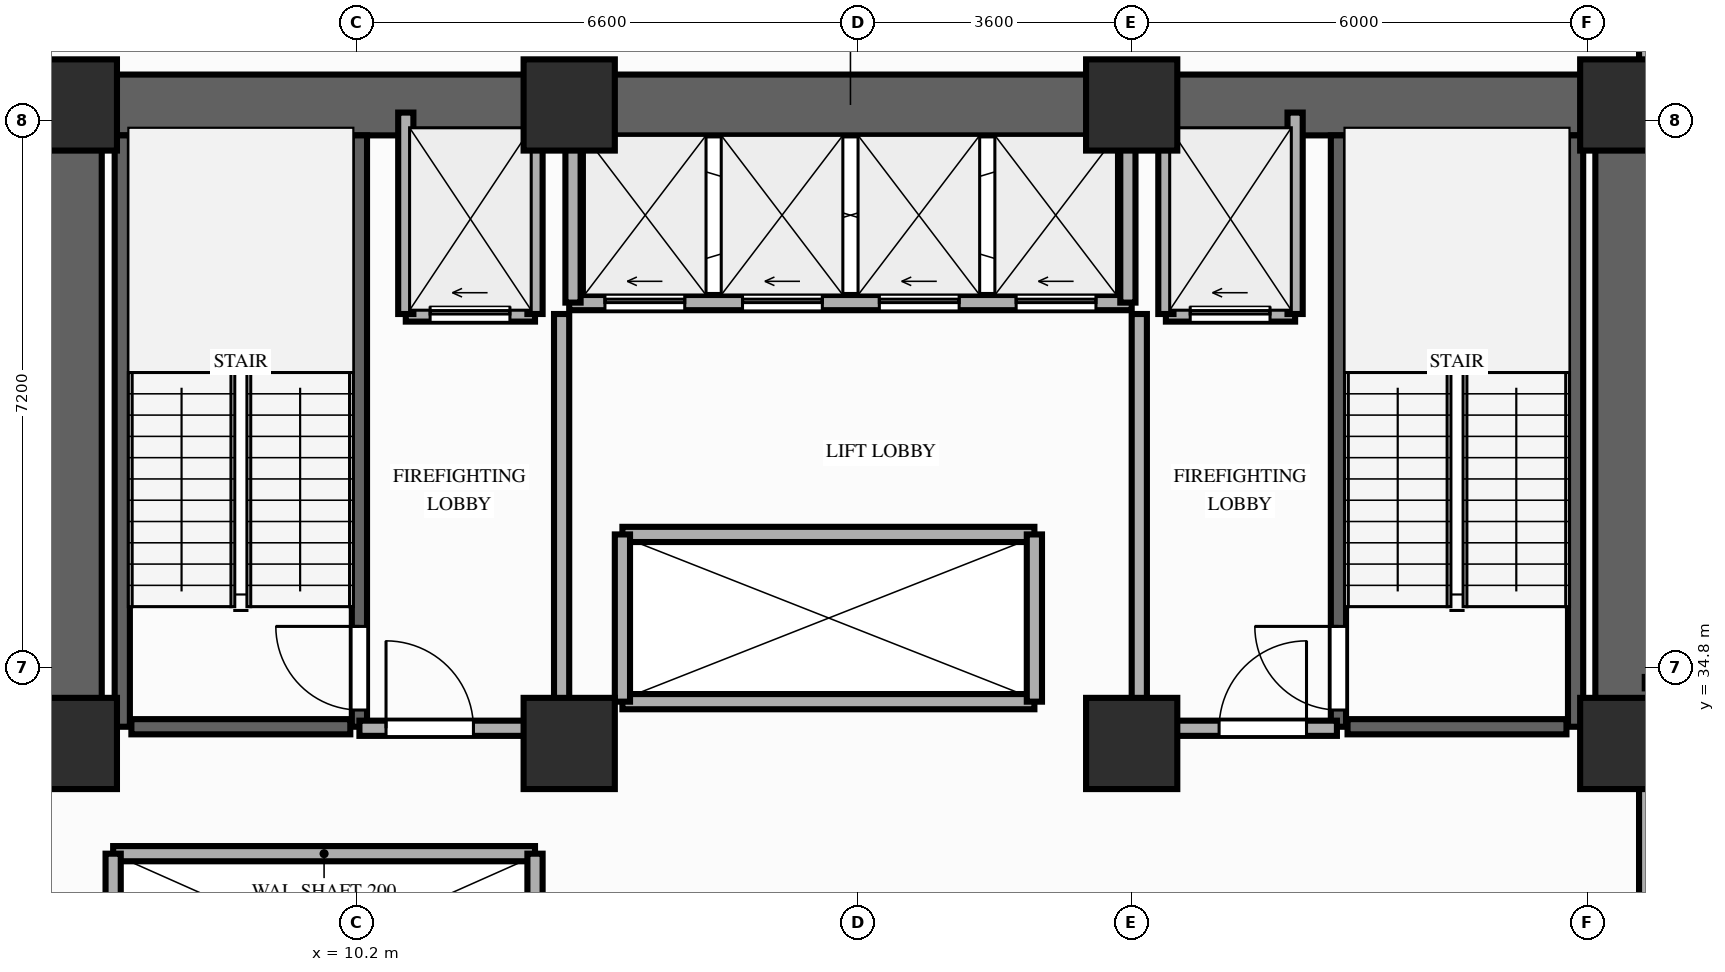
"""IFC4 building model, lengths in metres.
Left out: names, types, materials, properties, quantities, classifications, styles, units other than length and angle.
Written with IfcOpenShell. Run it as: python <this file> out.ifc"""

import sys

from ifc_helpers import new_model, si_unit, direction, frame, frame_2d, origin, origin_2d, place, context, subcontext, project, spatial, rectangle, extrude, element, fill, save


model = new_model("IFC4")
c1 = context("Model", 3, precision=1e-05, world=origin(), true_north=direction((0.0, 1.0)))
c2 = subcontext(c1, "Body", "Model", "MODEL_VIEW")
j1 = project(units=[si_unit("LENGTHUNIT", "METRE"), si_unit("PLANEANGLEUNIT", "RADIAN")], contexts=[c1])
p1 = place(None, origin())
s1 = spatial("IfcSite", under=j1, at=p1, CompositionType="ELEMENT")
p2 = place(p1, origin())
s2 = spatial("IfcBuilding", under=s1, at=p2, CompositionType="ELEMENT")
p3 = place(p2, frame((0.0, 0.0, 8.8)))
s3 = spatial("IfcBuildingStorey", under=s2, at=p3, CompositionType="ELEMENT", Elevation=8.8)
for number, where, z_axis, x_axis in (
    (1, (6.45, 33.8, 0.0), (0.0, 0.0, 1.0), (1.0, 0.0, 0.0)),
    (2, (13.0, 33.8, 0.0), (0.0, 0.0, 1.0), (1.0, 0.0, 0.0)),
    (3, (20.4, 33.8, 0.0), (0.0, 0.0, 1.0), (1.0, 0.0, 0.0)),
    (4, (26.9, 33.8, 0.0), (0.0, 0.0, 1.0), (1.0, 0.0, 0.0)),
    (5, (6.45, 42.2, 0.0), (0.0, 0.0, 1.0), (1.0, 0.0, 0.0)),
    (6, (13.0, 42.2, 0.0), (0.0, 0.0, 1.0), (1.0, 0.0, 0.0)),
    (7, (20.4, 42.2, 0.0), (0.0, 0.0, 1.0), (1.0, 0.0, 0.0)),
    (8, (26.9, 42.2, 0.0), (0.0, 0.0, 1.0), (1.0, 0.0, 0.0)),
):
    element("IfcColumn", number, at=place(p3, frame(where, z_axis=z_axis, x_axis=x_axis)), inside=s3, PredefinedType="COLUMN", context=c2, shape_type="SweptSolid", body=[
        extrude(rectangle(XDim=1.2, YDim=1.2, at=origin_2d()), origin(), (0.0, 0.0, 1.0), 4.2),
    ])
p4 = place(p3, frame((6.45, 42.2, 0.0), z_axis=(0.0, 0.0, 1.0), x_axis=(1.0, 0.0, 0.0)))
e9 = element("IfcWall", 9, at=p4, inside=s3, PredefinedType="SHEAR", context=c2, shape_type="SweptSolid", body=[
    extrude(rectangle(XDim=20.45, YDim=0.8, at=frame_2d((10.225, 0.0))), origin(), (0.0, 0.0, 1.0), 3.95),
])
for number, where, z_axis, x_axis in (
    (10, (6.45, 33.8, 0.0), (0.0, 0.0, 1.0), (0.0, 1.0, 0.0)),
    (11, (26.9, 33.8, 0.0), (0.0, 0.0, 1.0), (0.0, 1.0, 0.0)),
):
    element("IfcWall", number, at=place(p3, frame(where, z_axis=z_axis, x_axis=x_axis)), inside=s3, PredefinedType="SHEAR", context=c2, shape_type="SweptSolid", body=[
        extrude(rectangle(XDim=7.95, YDim=0.8, at=frame_2d((3.975, 0.0))), origin(), (0.0, 0.0, 1.0), 3.95),
    ])
p5 = place(p3, frame((7.12, 34.02, 0.0), z_axis=(0.0, 0.0, 1.0), x_axis=(0.0, 1.0, 0.0)))
e12 = element("IfcWall", 12, at=p5, inside=s3, PredefinedType="SHEAR", context=c2, shape_type="SweptSolid", body=[
    extrude(rectangle(XDim=7.78, YDim=0.2, at=frame_2d((3.89, 0.0))), origin(), (0.0, 0.0, 1.0), 3.95),
])
p6 = place(p3, frame((10.24, 34.02, 0.0), z_axis=(0.0, 0.0, 1.0), x_axis=(0.0, 1.0, 0.0)))
e13 = element("IfcWall", 13, at=p6, inside=s3, PredefinedType="SHEAR", context=c2, shape_type="SweptSolid", body=[
    extrude(rectangle(XDim=7.78, YDim=0.2, at=frame_2d((3.89, 0.0))), origin(), (0.0, 0.0, 1.0), 3.95),
])
p7 = place(p6, frame((0.22, 0.0, 0.0)))
e14 = element("IfcOpeningElement", 14, at=p7, cuts=e13, PredefinedType="OPENING", context=c2, shape_type="SweptSolid", body=[
    extrude(rectangle(XDim=1.1, YDim=2.15, at=frame_2d((0.55, 1.075))), frame((0.0, 0.11, 0.0), z_axis=(0.0, -1.0, 0.0), x_axis=(1.0, 0.0, 0.0)), (0.0, 0.0, 1.0), 0.22),
])
p8 = place(p3, frame((7.24, 34.02, 0.0), z_axis=(0.0, 0.0, 1.0), x_axis=(1.0, 0.0, 0.0)))
e15 = element("IfcWall", 15, at=p8, inside=s3, PredefinedType="SHEAR", context=c2, shape_type="SweptSolid", body=[
    extrude(rectangle(XDim=2.88, YDim=0.2, at=frame_2d((1.44, 0.0))), origin(), (0.0, 0.0, 1.0), 3.95),
])
p9 = place(p3, frame((23.12, 34.02, 0.0), z_axis=(0.0, 0.0, 1.0), x_axis=(0.0, 1.0, 0.0)))
e16 = element("IfcWall", 16, at=p9, inside=s3, PredefinedType="SHEAR", context=c2, shape_type="SweptSolid", body=[
    extrude(rectangle(XDim=7.78, YDim=0.2, at=frame_2d((3.89, 0.0))), origin(), (0.0, 0.0, 1.0), 3.95),
])
p10 = place(p9, frame((0.22, 0.0, 0.0)))
e17 = element("IfcOpeningElement", 17, at=p10, cuts=e16, PredefinedType="OPENING", context=c2, shape_type="SweptSolid", body=[
    extrude(rectangle(XDim=1.1, YDim=2.15, at=frame_2d((0.55, 1.075))), frame((0.0, 0.11, 0.0), z_axis=(0.0, -1.0, 0.0), x_axis=(1.0, 0.0, 0.0)), (0.0, 0.0, 1.0), 0.22),
])
p11 = place(p3, frame((26.24, 34.02, 0.0), z_axis=(0.0, 0.0, 1.0), x_axis=(0.0, 1.0, 0.0)))
e18 = element("IfcWall", 18, at=p11, inside=s3, PredefinedType="SHEAR", context=c2, shape_type="SweptSolid", body=[
    extrude(rectangle(XDim=7.78, YDim=0.2, at=frame_2d((3.89, 0.0))), origin(), (0.0, 0.0, 1.0), 3.95),
])
p12 = place(p3, frame((23.24, 34.02, 0.0), z_axis=(0.0, 0.0, 1.0), x_axis=(1.0, 0.0, 0.0)))
e19 = element("IfcWall", 19, at=p12, inside=s3, PredefinedType="SHEAR", context=c2, shape_type="SweptSolid", body=[
    extrude(rectangle(XDim=2.88, YDim=0.2, at=frame_2d((1.44, 0.0))), origin(), (0.0, 0.0, 1.0), 3.95),
])
p13 = place(p3, frame((7.0, 32.35, 0.0), z_axis=(0.0, 0.0, 1.0), x_axis=(1.0, 0.0, 0.0)))
e20 = element("IfcWall", 20, at=p13, inside=s3, PredefinedType="MOVABLE", context=c2, shape_type="SweptSolid", body=[
    extrude(rectangle(XDim=5.55, YDim=0.2, at=frame_2d((2.775, 0.0))), origin(), (0.0, 0.0, 1.0), 3.95),
])
for number, where, z_axis, x_axis in (
    (21, (7.0, 29.85, 0.0), (0.0, 0.0, 1.0), (0.0, 1.0, 0.0)),
    (22, (12.55, 29.85, 0.0), (0.0, 0.0, 1.0), (0.0, 1.0, 0.0)),
):
    element("IfcWall", number, at=place(p3, frame(where, z_axis=z_axis, x_axis=x_axis)), inside=s3, PredefinedType="MOVABLE", context=c2, shape_type="SweptSolid", body=[
        extrude(rectangle(XDim=2.5, YDim=0.2, at=frame_2d((1.25, 0.0))), origin(), (0.0, 0.0, 1.0), 3.95),
    ])
p14 = place(p3, frame((10.85, 39.45, 0.0), z_axis=(0.0, 0.0, 1.0), x_axis=(1.0, 0.0, 0.0)))
e23 = element("IfcWall", 23, at=p14, inside=s3, PredefinedType="MOVABLE", context=c2, shape_type="SweptSolid", body=[
    extrude(rectangle(XDim=1.7, YDim=0.2, at=frame_2d((0.85, 0.0))), origin(), (0.0, 0.0, 1.0), 3.95),
])
p15 = place(p14, frame((0.32, 0.0, 0.0)))
e24 = element("IfcOpeningElement", 24, at=p15, cuts=e23, PredefinedType="OPENING", context=c2, shape_type="SweptSolid", body=[
    extrude(rectangle(XDim=1.05, YDim=2.15, at=frame_2d((0.525, 1.075))), frame((0.0, 0.11, 0.0), z_axis=(0.0, -1.0, 0.0), x_axis=(1.0, 0.0, 0.0)), (0.0, 0.0, 1.0), 0.22),
])
p16 = place(p3, frame((20.85, 39.45, 0.0), z_axis=(0.0, 0.0, 1.0), x_axis=(1.0, 0.0, 0.0)))
e25 = element("IfcWall", 25, at=p16, inside=s3, PredefinedType="MOVABLE", context=c2, shape_type="SweptSolid", body=[
    extrude(rectangle(XDim=1.7, YDim=0.2, at=frame_2d((0.85, 0.0))), origin(), (0.0, 0.0, 1.0), 3.95),
])
p17 = place(p16, frame((0.32, 0.0, 0.0)))
e26 = element("IfcOpeningElement", 26, at=p17, cuts=e25, PredefinedType="OPENING", context=c2, shape_type="SweptSolid", body=[
    extrude(rectangle(XDim=1.05, YDim=2.15, at=frame_2d((0.525, 1.075))), frame((0.0, 0.11, 0.0), z_axis=(0.0, -1.0, 0.0), x_axis=(1.0, 0.0, 0.0)), (0.0, 0.0, 1.0), 0.22),
])
for number, where, z_axis, x_axis in (
    (27, (10.85, 39.45, 0.0), (0.0, 0.0, 1.0), (0.0, 1.0, 0.0)),
    (28, (12.55, 39.45, 0.0), (0.0, 0.0, 1.0), (0.0, 1.0, 0.0)),
):
    element("IfcWall", number, at=place(p3, frame(where, z_axis=z_axis, x_axis=x_axis)), inside=s3, PredefinedType="MOVABLE", context=c2, shape_type="SweptSolid", body=[
        extrude(rectangle(XDim=2.65, YDim=0.2, at=frame_2d((1.325, 0.0))), origin(), (0.0, 0.0, 1.0), 3.95),
    ])
p18 = place(p3, frame((12.9, 34.0, 0.0), z_axis=(0.0, 0.0, 1.0), x_axis=(0.0, 1.0, 0.0)))
e29 = element("IfcWall", 29, at=p18, inside=s3, PredefinedType="PARTITIONING", context=c2, shape_type="SweptSolid", body=[
    extrude(rectangle(XDim=5.45, YDim=0.2, at=frame_2d((2.725, 0.0))), origin(), (0.0, 0.0, 1.0), 3.13),
])
p19 = place(p3, frame((10.24, 34.0, 0.0), z_axis=(0.0, 0.0, 1.0), x_axis=(1.0, 0.0, 0.0)))
e30 = element("IfcWall", 30, at=p19, inside=s3, PredefinedType="PARTITIONING", context=c2, shape_type="SweptSolid", body=[
    extrude(rectangle(XDim=2.66, YDim=0.2, at=frame_2d((1.33, 0.0))), origin(), (0.0, 0.0, 1.0), 3.13),
])
p20 = place(p19, frame((0.35, 0.0, 0.0)))
e31 = element("IfcOpeningElement", 31, at=p20, cuts=e30, PredefinedType="OPENING", context=c2, shape_type="SweptSolid", body=[
    extrude(rectangle(XDim=1.15, YDim=2.15, at=frame_2d((0.575, 1.075))), frame((0.0, 0.11, 0.0), z_axis=(0.0, -1.0, 0.0), x_axis=(1.0, 0.0, 0.0)), (0.0, 0.0, 1.0), 0.22),
])
for number, where, z_axis, x_axis in (
    (32, (20.85, 39.45, 0.0), (0.0, 0.0, 1.0), (0.0, 1.0, 0.0)),
    (33, (22.55, 39.45, 0.0), (0.0, 0.0, 1.0), (0.0, 1.0, 0.0)),
):
    element("IfcWall", number, at=place(p3, frame(where, z_axis=z_axis, x_axis=x_axis)), inside=s3, PredefinedType="MOVABLE", context=c2, shape_type="SweptSolid", body=[
        extrude(rectangle(XDim=2.65, YDim=0.2, at=frame_2d((1.325, 0.0))), origin(), (0.0, 0.0, 1.0), 3.95),
    ])
p21 = place(p3, frame((20.5, 34.0, 0.0), z_axis=(0.0, 0.0, 1.0), x_axis=(0.0, 1.0, 0.0)))
e34 = element("IfcWall", 34, at=p21, inside=s3, PredefinedType="PARTITIONING", context=c2, shape_type="SweptSolid", body=[
    extrude(rectangle(XDim=5.45, YDim=0.2, at=frame_2d((2.725, 0.0))), origin(), (0.0, 0.0, 1.0), 3.13),
])
p22 = place(p3, frame((20.5, 34.0, 0.0), z_axis=(0.0, 0.0, 1.0), x_axis=(1.0, 0.0, 0.0)))
e35 = element("IfcWall", 35, at=p22, inside=s3, PredefinedType="PARTITIONING", context=c2, shape_type="SweptSolid", body=[
    extrude(rectangle(XDim=2.6, YDim=0.2, at=frame_2d((1.3, 0.0))), origin(), (0.0, 0.0, 1.0), 3.13),
])
p23 = place(p22, frame((1.05, 0.0, 0.0)))
e36 = element("IfcOpeningElement", 36, at=p23, cuts=e35, PredefinedType="OPENING", context=c2, shape_type="SweptSolid", body=[
    extrude(rectangle(XDim=1.15, YDim=2.15, at=frame_2d((0.575, 1.075))), frame((0.0, 0.11, 0.0), z_axis=(0.0, -1.0, 0.0), x_axis=(1.0, 0.0, 0.0)), (0.0, 0.0, 1.0), 0.22),
])
p24 = place(p3, frame((13.0, 39.6, 0.0), z_axis=(0.0, 0.0, 1.0), x_axis=(1.0, 0.0, 0.0)))
e37 = element("IfcWall", 37, at=p24, inside=s3, PredefinedType="MOVABLE", context=c2, shape_type="SweptSolid", body=[
    extrude(rectangle(XDim=7.4, YDim=0.2, at=frame_2d((3.7, 0.0))), origin(), (0.0, 0.0, 1.0), 3.95),
])
p25 = place(p24, frame((0.47, 0.0, 0.0)))
e38 = element("IfcOpeningElement", 38, at=p25, cuts=e37, PredefinedType="OPENING", context=c2, shape_type="SweptSolid", body=[
    extrude(rectangle(XDim=1.05, YDim=2.15, at=frame_2d((0.525, 1.075))), frame((0.0, 0.11, 0.0), z_axis=(0.0, -1.0, 0.0), x_axis=(1.0, 0.0, 0.0)), (0.0, 0.0, 1.0), 0.22),
])
p26 = place(p24, frame((2.28, 0.0, 0.0)))
e39 = element("IfcOpeningElement", 39, at=p26, cuts=e37, PredefinedType="OPENING", context=c2, shape_type="SweptSolid", body=[
    extrude(rectangle(XDim=1.05, YDim=2.15, at=frame_2d((0.525, 1.075))), frame((0.0, 0.11, 0.0), z_axis=(0.0, -1.0, 0.0), x_axis=(1.0, 0.0, 0.0)), (0.0, 0.0, 1.0), 0.22),
])
p27 = place(p24, frame((4.08, 0.0, 0.0)))
e40 = element("IfcOpeningElement", 40, at=p27, cuts=e37, PredefinedType="OPENING", context=c2, shape_type="SweptSolid", body=[
    extrude(rectangle(XDim=1.05, YDim=2.15, at=frame_2d((0.525, 1.075))), frame((0.0, 0.11, 0.0), z_axis=(0.0, -1.0, 0.0), x_axis=(1.0, 0.0, 0.0)), (0.0, 0.0, 1.0), 0.22),
])
p28 = place(p24, frame((5.88, 0.0, 0.0)))
e41 = element("IfcOpeningElement", 41, at=p28, cuts=e37, PredefinedType="OPENING", context=c2, shape_type="SweptSolid", body=[
    extrude(rectangle(XDim=1.05, YDim=2.15, at=frame_2d((0.525, 1.075))), frame((0.0, 0.11, 0.0), z_axis=(0.0, -1.0, 0.0), x_axis=(1.0, 0.0, 0.0)), (0.0, 0.0, 1.0), 0.22),
])
for number, where, z_axis, x_axis in (
    (42, (13.05, 39.6, 0.0), (0.0, 0.0, 1.0), (0.0, 1.0, 0.0)),
    (43, (20.35, 39.6, 0.0), (0.0, 0.0, 1.0), (0.0, 1.0, 0.0)),
):
    element("IfcWall", number, at=place(p3, frame(where, z_axis=z_axis, x_axis=x_axis)), inside=s3, PredefinedType="MOVABLE", context=c2, shape_type="SweptSolid", body=[
        extrude(rectangle(XDim=2.18, YDim=0.2, at=frame_2d((1.09, 0.0))), origin(), (0.0, 0.0, 1.0), 3.95),
    ])
for number, where, z_axis, x_axis in (
    (44, (13.7, 34.35, 0.0), (0.0, 0.0, 1.0), (1.0, 0.0, 0.0)),
    (45, (13.7, 36.55, 0.0), (0.0, 0.0, 1.0), (1.0, 0.0, 0.0)),
):
    element("IfcWall", number, at=place(p3, frame(where, z_axis=z_axis, x_axis=x_axis)), inside=s3, PredefinedType="MOVABLE", context=c2, shape_type="SweptSolid", body=[
        extrude(rectangle(XDim=5.42, YDim=0.2, at=frame_2d((2.71, 0.0))), origin(), (0.0, 0.0, 1.0), 3.95),
    ])
for number, where, z_axis, x_axis in (
    (46, (13.7, 34.35, 0.0), (0.0, 0.0, 1.0), (0.0, 1.0, 0.0)),
    (47, (19.12, 34.35, 0.0), (0.0, 0.0, 1.0), (0.0, 1.0, 0.0)),
):
    element("IfcWall", number, at=place(p3, frame(where, z_axis=z_axis, x_axis=x_axis)), inside=s3, PredefinedType="MOVABLE", context=c2, shape_type="SweptSolid", body=[
        extrude(rectangle(XDim=2.2, YDim=0.2, at=frame_2d((1.1, 0.0))), origin(), (0.0, 0.0, 1.0), 3.95),
    ])
p29 = place(p3, frame((27.15, 29.8, 0.0), z_axis=(0.0, 0.0, 1.0), x_axis=(0.0, 1.0, 0.0)))
e48 = element("IfcWall", 48, at=p29, inside=s3, PredefinedType="PARTITIONING", context=c2, shape_type="SweptSolid", body=[
    extrude(rectangle(XDim=3.85, YDim=0.15, at=frame_2d((1.925, 0.0))), origin(), (0.0, 0.0, 1.0), 3.13),
])
p30 = place(p3, frame((27.15, 42.65, 0.0), z_axis=(0.0, 0.0, 1.0), x_axis=(0.0, 1.0, 0.0)))
e49 = element("IfcWall", 49, at=p30, inside=s3, PredefinedType="PARTITIONING", context=c2, shape_type="SweptSolid", body=[
    extrude(rectangle(XDim=6.2, YDim=0.15, at=frame_2d((3.1, 0.0))), origin(), (0.0, 0.0, 1.0), 3.95),
])
p31 = place(p3, frame((27.15, 34.6, 0.0), z_axis=(0.0, 0.0, 1.0), x_axis=(1.0, 0.0, 0.0)))
e50 = element("IfcWall", 50, at=p31, inside=s3, PredefinedType="PARTITIONING", context=c2, shape_type="SweptSolid", body=[
    extrude(rectangle(XDim=7.85, YDim=0.15, at=frame_2d((3.925, 0.0))), origin(), (0.0, 0.0, 1.0), 3.13),
])
p32 = place(p7, origin())
e51 = element("IfcDoor", 51, at=p32, inside=s3, OperationType="SINGLE_SWING_RIGHT", PredefinedType="DOOR", context=c2, shape_type="SweptSolid", body=[
    extrude(rectangle(XDim=1.1, YDim=2.15, at=frame_2d((0.55, 1.075))), frame((0.0, 0.025, 0.0), z_axis=(0.0, -1.0, 0.0), x_axis=(1.0, 0.0, 0.0)), (0.0, 0.0, 1.0), 0.05),
])
fill(e14, e51)
p33 = place(p10, origin())
e52 = element("IfcDoor", 52, at=p33, inside=s3, OperationType="SINGLE_SWING_RIGHT", PredefinedType="DOOR", context=c2, shape_type="SweptSolid", body=[
    extrude(rectangle(XDim=1.1, YDim=2.15, at=frame_2d((0.55, 1.075))), frame((0.0, 0.025, 0.0), z_axis=(0.0, -1.0, 0.0), x_axis=(1.0, 0.0, 0.0)), (0.0, 0.0, 1.0), 0.05),
])
fill(e17, e52)
p34 = place(p15, origin())
e53 = element("IfcDoor", 53, at=p34, inside=s3, OperationType="SLIDING_TO_LEFT", PredefinedType="DOOR", context=c2, shape_type="SweptSolid", body=[
    extrude(rectangle(XDim=1.05, YDim=2.15, at=frame_2d((0.525, 1.075))), frame((0.0, 0.025, 0.0), z_axis=(0.0, -1.0, 0.0), x_axis=(1.0, 0.0, 0.0)), (0.0, 0.0, 1.0), 0.05),
])
fill(e24, e53)
p35 = place(p17, origin())
e54 = element("IfcDoor", 54, at=p35, inside=s3, OperationType="SLIDING_TO_LEFT", PredefinedType="DOOR", context=c2, shape_type="SweptSolid", body=[
    extrude(rectangle(XDim=1.05, YDim=2.15, at=frame_2d((0.525, 1.075))), frame((0.0, 0.025, 0.0), z_axis=(0.0, -1.0, 0.0), x_axis=(1.0, 0.0, 0.0)), (0.0, 0.0, 1.0), 0.05),
])
fill(e26, e54)
p36 = place(p20, origin())
e55 = element("IfcDoor", 55, at=p36, inside=s3, OperationType="SINGLE_SWING_LEFT", PredefinedType="DOOR", context=c2, shape_type="SweptSolid", body=[
    extrude(rectangle(XDim=1.15, YDim=2.15, at=frame_2d((0.575, 1.075))), frame((0.0, 0.025, 0.0), z_axis=(0.0, -1.0, 0.0), x_axis=(1.0, 0.0, 0.0)), (0.0, 0.0, 1.0), 0.05),
])
fill(e31, e55)
p37 = place(p23, origin())
e56 = element("IfcDoor", 56, at=p37, inside=s3, OperationType="SINGLE_SWING_RIGHT", PredefinedType="DOOR", context=c2, shape_type="SweptSolid", body=[
    extrude(rectangle(XDim=1.15, YDim=2.15, at=frame_2d((0.575, 1.075))), frame((0.0, 0.025, 0.0), z_axis=(0.0, -1.0, 0.0), x_axis=(1.0, 0.0, 0.0)), (0.0, 0.0, 1.0), 0.05),
])
fill(e36, e56)
p38 = place(p25, origin())
e57 = element("IfcDoor", 57, at=p38, inside=s3, OperationType="SLIDING_TO_LEFT", PredefinedType="DOOR", context=c2, shape_type="SweptSolid", body=[
    extrude(rectangle(XDim=1.05, YDim=2.15, at=frame_2d((0.525, 1.075))), frame((0.0, 0.025, 0.0), z_axis=(0.0, -1.0, 0.0), x_axis=(1.0, 0.0, 0.0)), (0.0, 0.0, 1.0), 0.05),
])
fill(e38, e57)
p39 = place(p26, origin())
e58 = element("IfcDoor", 58, at=p39, inside=s3, OperationType="SLIDING_TO_LEFT", PredefinedType="DOOR", context=c2, shape_type="SweptSolid", body=[
    extrude(rectangle(XDim=1.05, YDim=2.15, at=frame_2d((0.525, 1.075))), frame((0.0, 0.025, 0.0), z_axis=(0.0, -1.0, 0.0), x_axis=(1.0, 0.0, 0.0)), (0.0, 0.0, 1.0), 0.05),
])
fill(e39, e58)
p40 = place(p27, origin())
e59 = element("IfcDoor", 59, at=p40, inside=s3, OperationType="SLIDING_TO_LEFT", PredefinedType="DOOR", context=c2, shape_type="SweptSolid", body=[
    extrude(rectangle(XDim=1.05, YDim=2.15, at=frame_2d((0.525, 1.075))), frame((0.0, 0.025, 0.0), z_axis=(0.0, -1.0, 0.0), x_axis=(1.0, 0.0, 0.0)), (0.0, 0.0, 1.0), 0.05),
])
fill(e40, e59)
p41 = place(p28, origin())
e60 = element("IfcDoor", 60, at=p41, inside=s3, OperationType="SLIDING_TO_LEFT", PredefinedType="DOOR", context=c2, shape_type="SweptSolid", body=[
    extrude(rectangle(XDim=1.05, YDim=2.15, at=frame_2d((0.525, 1.075))), frame((0.0, 0.025, 0.0), z_axis=(0.0, -1.0, 0.0), x_axis=(1.0, 0.0, 0.0)), (0.0, 0.0, 1.0), 0.05),
])
fill(e41, e60)
save(model, sys.argv[1])
